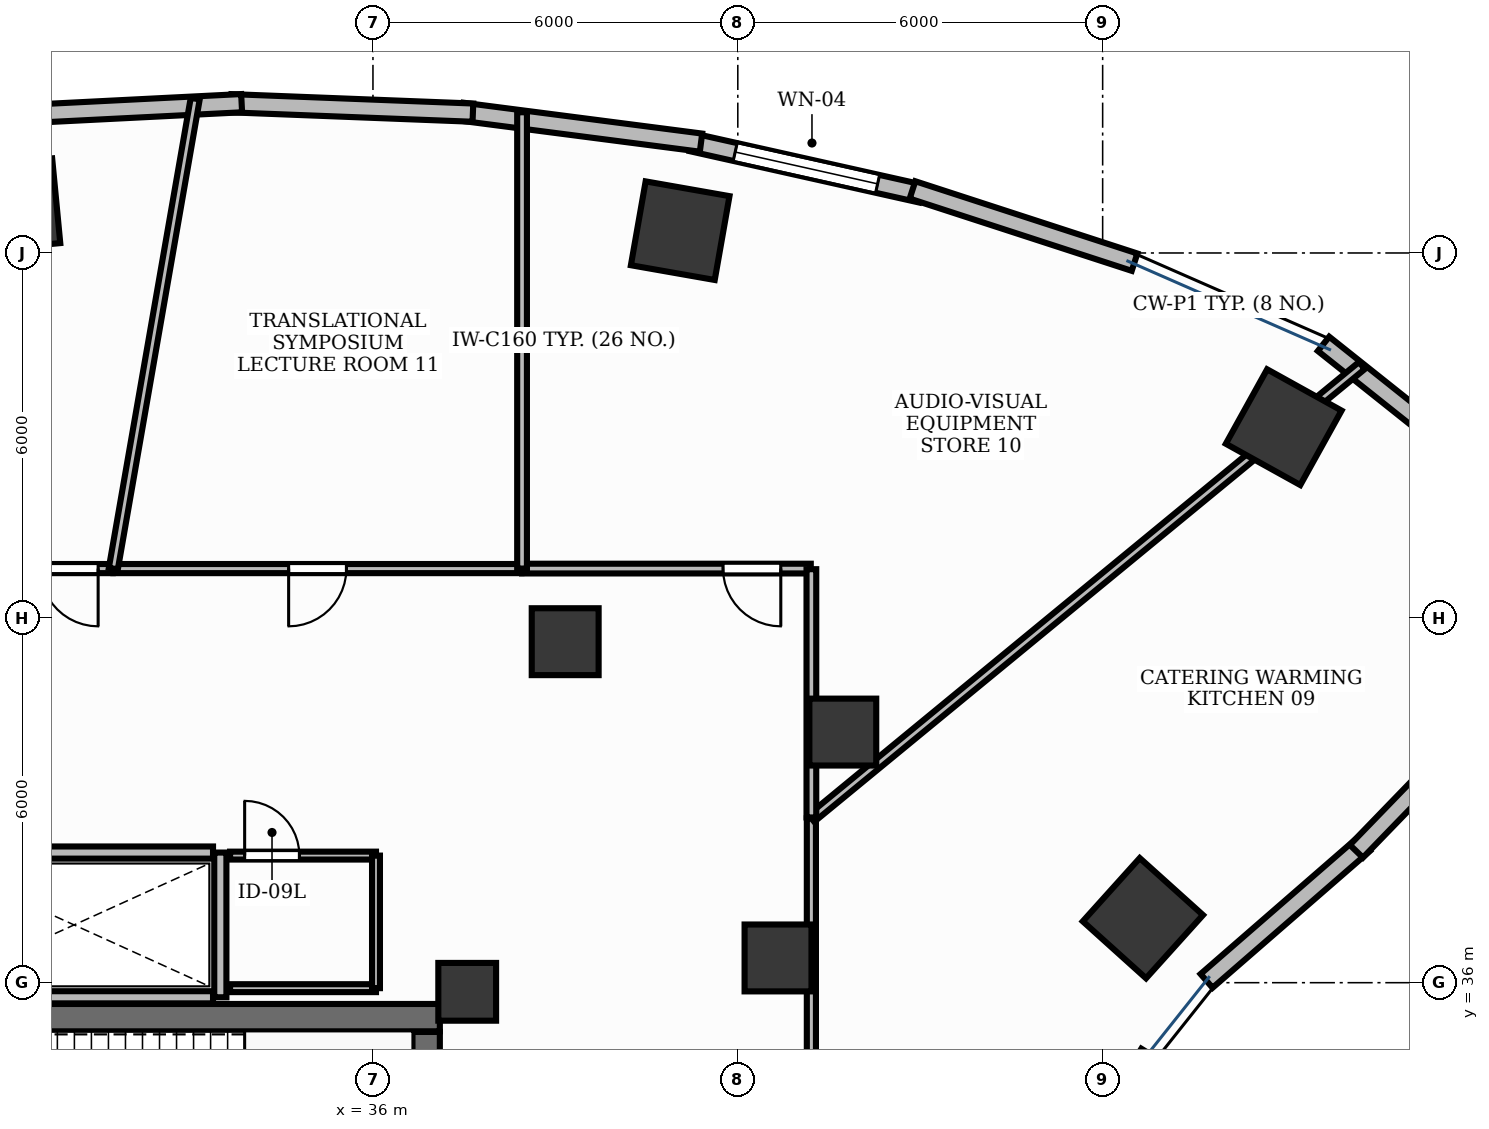
"""IFC4 building model, lengths in metres.
Left out: names, types, materials, properties, quantities, classifications, styles, units other than length and angle.
Written with IfcOpenShell. Run it as: python <this file> out.ifc"""

import sys

from ifc_helpers import new_model, si_unit, direction, frame, frame_2d, origin, origin_2d, place, context, subcontext, project, spatial, rectangle, extrude, element, fill, save


model = new_model("IFC4")
c1 = context("Model", 3, precision=1e-05, world=origin(), true_north=direction((0.0, 1.0)))
c2 = subcontext(c1, "Body", "Model", "MODEL_VIEW")
j1 = project(units=[si_unit("LENGTHUNIT", "METRE"), si_unit("PLANEANGLEUNIT", "RADIAN")], contexts=[c1])
p1 = place(None, origin())
s1 = spatial("IfcSite", under=j1, at=p1, CompositionType="ELEMENT")
p2 = place(p1, origin())
s2 = spatial("IfcBuilding", under=s1, at=p2, CompositionType="ELEMENT")
p3 = place(p2, frame((0.0, 0.0, 5.4)))
s3 = spatial("IfcBuildingStorey", under=s2, at=p3, CompositionType="ELEMENT", Elevation=5.4)
p4 = place(p3, frame((28.852, 35.425, 0.0), z_axis=(0.0, 0.0, 1.0), x_axis=(1.0, 0.0, 0.0)))
e1 = element("IfcWall", 1, at=p4, inside=s3, PredefinedType="SHEAR", context=c2, shape_type="SweptSolid", body=[
    extrude(rectangle(XDim=8.248, YDim=0.45, at=frame_2d((4.124, 0.0))), origin(), (0.0, 0.0, 1.0), 4.5),
])
p5 = place(p3, frame((36.875, 32.11, 0.0), z_axis=(0.0, 0.0, 1.0), x_axis=(0.0, 1.0, 0.0)))
e2 = element("IfcWall", 2, at=p5, inside=s3, PredefinedType="SHEAR", context=c2, shape_type="SweptSolid", body=[
    extrude(rectangle(XDim=3.08, YDim=0.45, at=frame_2d((1.54, 0.0))), origin(), (0.0, 0.0, 1.0), 4.5),
])
p6 = place(p3, frame((37.55, 35.85, -0.0), z_axis=(0.0, 0.0, 1.0), x_axis=(1.0, 0.0, 0.0)))
e3 = element("IfcColumn", 3, at=p6, inside=s3, PredefinedType="PILASTER", context=c2, shape_type="SweptSolid", body=[
    extrude(rectangle(XDim=0.95, YDim=0.95, at=origin_2d()), origin(), (0.0, 0.0, 1.0), 4.501),
])
p7 = place(p3, frame((50.977, 45.135, -0.0), z_axis=(0.0, 0.0, 1.0), x_axis=(-0.874535078577, 0.484962262797, 0.0)))
e4 = element("IfcColumn", 4, at=p7, inside=s3, PredefinedType="COLUMN", context=c2, shape_type="SweptSolid", body=[
    extrude(rectangle(XDim=1.4, YDim=1.4, at=origin_2d()), origin(), (0.0, 0.0, 1.0), 4.501),
])
p8 = place(p3, frame((43.727, 40.121, -0.0), z_axis=(0.0, 0.0, 1.0), x_axis=(1.0, 0.0, 0.0)))
e5 = element("IfcColumn", 5, at=p8, inside=s3, PredefinedType="COLUMN", context=c2, shape_type="SweptSolid", body=[
    extrude(rectangle(XDim=1.1, YDim=1.1, at=origin_2d()), origin(), (0.0, 0.0, 1.0), 4.501),
])
p9 = place(p3, frame((41.052, 48.367, -0.0), z_axis=(0.0, 0.0, 1.0), x_axis=(-0.984868307662, 0.173304404339, 0.0)))
e6 = element("IfcColumn", 6, at=p9, inside=s3, PredefinedType="COLUMN", context=c2, shape_type="SweptSolid", body=[
    extrude(rectangle(XDim=1.4, YDim=1.4, at=origin_2d()), origin(), (0.0, 0.0, 1.0), 4.501),
])
p10 = place(p3, frame((39.161, 41.608, -0.0), z_axis=(0.0, 0.0, 1.0), x_axis=(1.0, 0.0, 0.0)))
e7 = element("IfcColumn", 7, at=p10, inside=s3, PredefinedType="COLUMN", context=c2, shape_type="SweptSolid", body=[
    extrude(rectangle(XDim=1.1, YDim=1.1, at=origin_2d()), origin(), (0.0, 0.0, 1.0), 4.501),
])
for number, where, z_axis, x_axis in (
    (8, (30.094, 48.792, -0.0), (0.0, 0.0, 1.0), (0.995, 0.095, 0.0)),
    (9, (48.662, 37.061, -0.0), (0.0, 0.0, 1.0), (0.669, 0.743, 0.0)),
):
    element("IfcColumn", number, at=place(p3, frame(where, z_axis=z_axis, x_axis=x_axis)), inside=s3, PredefinedType="COLUMN", context=c2, shape_type="SweptSolid", body=[
        extrude(rectangle(XDim=1.4, YDim=1.4, at=origin_2d()), origin(), (0.0, 0.0, 1.0), 4.501),
    ])
p11 = place(p3, frame((42.662, 36.407, -0.0), z_axis=(0.0, 0.0, 1.0), x_axis=(1.0, 0.0, 0.0)))
e10 = element("IfcColumn", 10, at=p11, inside=s3, PredefinedType="COLUMN", context=c2, shape_type="SweptSolid", body=[
    extrude(rectangle(XDim=1.1, YDim=1.1, at=origin_2d()), origin(), (0.0, 0.0, 1.0), 4.501),
])
p12 = place(p3, frame((45.016, 48.976, 0.0), z_axis=(0.0, 0.0, 1.0), x_axis=(-0.9758772609, 0.218319883791, 0.0)))
e11 = element("IfcWall", 11, at=p12, inside=s3, PredefinedType="STANDARD", context=c2, shape_type="SweptSolid", body=[
    extrude(rectangle(XDim=3.869, YDim=0.3, at=frame_2d((1.935, 0.0))), origin(), (0.0, 0.0, 1.0), 4.5),
])
p13 = place(p12, frame((0.735, 0.0, 1.5)))
e12 = element("IfcOpeningElement", 12, at=p13, cuts=e11, PredefinedType="OPENING", context=c2, shape_type="SweptSolid", body=[
    extrude(rectangle(XDim=2.4, YDim=1.2, at=frame_2d((1.2, 0.6))), frame((0.0, 0.165, 0.0), z_axis=(0.0, -1.0, 0.0), x_axis=(1.0, 0.0, 0.0)), (0.0, 0.0, 1.0), 0.33),
])
p14 = place(p3, frame((48.525, 47.849, 0.0), z_axis=(0.0, 0.0, 1.0), x_axis=(-0.950965833732, 0.309295947393, 0.0)))
e13 = element("IfcWall", 13, at=p14, inside=s3, PredefinedType="STANDARD", context=c2, shape_type="SweptSolid", body=[
    extrude(rectangle(XDim=3.84, YDim=0.3, at=frame_2d((1.92, 0.0))), origin(), (0.0, 0.0, 1.0), 4.5),
])
p15 = place(p3, frame((41.395, 49.815, 0.0), z_axis=(0.0, 0.0, 1.0), x_axis=(-0.991734095036, 0.128310111617, 0.0)))
e14 = element("IfcWall", 14, at=p15, inside=s3, PredefinedType="STANDARD", context=c2, shape_type="SweptSolid", body=[
    extrude(rectangle(XDim=3.956, YDim=0.3, at=frame_2d((1.978, 0.0))), origin(), (0.0, 0.0, 1.0), 4.5),
])
p16 = place(p3, frame((37.644, 50.308, 0.0), z_axis=(0.0, 0.0, 1.0), x_axis=(-0.999245411623, 0.038840794937, 0.0)))
e15 = element("IfcWall", 15, at=p16, inside=s3, PredefinedType="STANDARD", context=c2, shape_type="SweptSolid", body=[
    extrude(rectangle(XDim=3.979, YDim=0.3, at=frame_2d((1.989, 0.0))), origin(), (0.0, 0.0, 1.0), 4.5),
])
p17 = place(p3, frame((33.84, 50.463, 0.0), z_axis=(0.0, 0.0, 1.0), x_axis=(-0.998732359232, -0.050335619826, 0.0)))
e16 = element("IfcWall", 16, at=p17, inside=s3, PredefinedType="STANDARD", context=c2, shape_type="SweptSolid", body=[
    extrude(rectangle(XDim=3.977, YDim=0.3, at=frame_2d((1.989, 0.0))), origin(), (0.0, 0.0, 1.0), 4.5),
])
p18 = place(p3, frame((47.825, 33.303, 0.0), z_axis=(0.0, 0.0, 1.0), x_axis=(0.522520662875, 0.852626622191, 0.0)))
e17 = element("IfcWall", 17, at=p18, inside=s3, PredefinedType="STANDARD", context=c2, shape_type="SweptSolid", body=[
    extrude(rectangle(XDim=1.798, YDim=0.3, at=frame_2d((0.899, 0.0))), origin(), (0.0, 0.0, 1.0), 4.5),
])
p19 = place(p3, frame((49.709, 36.029, 0.0), z_axis=(0.0, 0.0, 1.0), x_axis=(0.754746490246, 0.656016566454, 0.0)))
e18 = element("IfcWall", 18, at=p19, inside=s3, PredefinedType="STANDARD", context=c2, shape_type="SweptSolid", body=[
    extrude(rectangle(XDim=3.43, YDim=0.3, at=frame_2d((1.715, 0.0))), origin(), (0.0, 0.0, 1.0), 4.5),
])
p20 = place(p3, frame((52.173, 38.161, 0.0), z_axis=(0.0, 0.0, 1.0), x_axis=(0.695404695719, 0.718618333451, 0.0)))
e19 = element("IfcWall", 19, at=p20, inside=s3, PredefinedType="STANDARD", context=c2, shape_type="SweptSolid", body=[
    extrude(rectangle(XDim=2.188, YDim=0.3, at=frame_2d((1.094, 0.0))), origin(), (0.0, 0.0, 1.0), 4.5),
])
p21 = place(p3, frame((53.344, 45.143, 0.0), z_axis=(0.0, 0.0, 1.0), x_axis=(-0.782282158644, 0.622924252432, 0.0)))
e20 = element("IfcWall", 20, at=p21, inside=s3, PredefinedType="STANDARD", context=c2, shape_type="SweptSolid", body=[
    extrude(rectangle(XDim=2.188, YDim=0.3, at=frame_2d((1.094, 0.0))), origin(), (0.0, 0.0, 1.0), 4.5),
])
p22 = place(p3, frame((33.49, 35.76, 0.0), z_axis=(0.0, 0.0, 1.0), x_axis=(0.0, 1.0, 0.0)))
e21 = element("IfcWall", 21, at=p22, inside=s3, PredefinedType="PARTITIONING", context=c2, shape_type="SweptSolid", body=[
    extrude(rectangle(XDim=2.38, YDim=0.2, at=frame_2d((1.19, 0.0))), origin(), (0.0, 0.0, 1.0), 3.51),
])
for number, where, z_axis, x_axis in (
    (22, (28.8, 35.76, 0.0), (0.0, 0.0, 1.0), (1.0, 0.0, 0.0)),
    (23, (28.8, 38.14, 0.0), (0.0, 0.0, 1.0), (1.0, 0.0, 0.0)),
):
    element("IfcWall", number, at=place(p3, frame(where, z_axis=z_axis, x_axis=x_axis)), inside=s3, PredefinedType="PARTITIONING", context=c2, shape_type="SweptSolid", body=[
        extrude(rectangle(XDim=4.57, YDim=0.2, at=frame_2d((2.285, 0.0))), origin(), (0.0, 0.0, 1.0), 3.51),
    ])
p23 = place(p3, frame((33.65, 38.09, 0.0), z_axis=(0.0, 0.0, 1.0), x_axis=(1.0, 0.0, 0.0)))
e24 = element("IfcWall", 24, at=p23, inside=s3, PredefinedType="PARTITIONING", context=c2, shape_type="SweptSolid", body=[
    extrude(rectangle(XDim=2.4, YDim=0.13, at=frame_2d((1.2, 0.0))), origin(), (0.0, 0.0, 1.0), 3.51),
])
p24 = place(p23, frame((0.24, 0.0, 0.0)))
e25 = element("IfcOpeningElement", 25, at=p24, cuts=e24, PredefinedType="OPENING", context=c2, shape_type="SweptSolid", body=[
    extrude(rectangle(XDim=0.9, YDim=2.15, at=frame_2d((0.45, 1.075))), frame((0.0, 0.08, 0.0), z_axis=(0.0, -1.0, 0.0), x_axis=(1.0, 0.0, 0.0)), (0.0, 0.0, 1.0), 0.16),
])
p25 = place(p3, frame((43.21, 27.902, 0.0), z_axis=(0.0, 0.0, 1.0), x_axis=(0.0, 1.0, 0.0)))
e26 = element("IfcWall", 26, at=p25, inside=s3, PredefinedType="PARTITIONING", context=c2, shape_type="SweptSolid", body=[
    extrude(rectangle(XDim=10.802, YDim=0.15, at=frame_2d((5.401, 0.0))), origin(), (0.0, 0.0, 1.0), 3.51),
])
p26 = place(p25, frame((3.62, 0.0, 0.0)))
e27 = element("IfcOpeningElement", 27, at=p26, cuts=e26, PredefinedType="OPENING", context=c2, shape_type="SweptSolid", body=[
    extrude(rectangle(XDim=0.95, YDim=2.15, at=frame_2d((0.475, 1.075))), frame((0.0, 0.09, 0.0), z_axis=(0.0, -1.0, 0.0), x_axis=(1.0, 0.0, 0.0)), (0.0, 0.0, 1.0), 0.18),
])
p27 = place(p3, frame((43.2, 42.81, 0.0), z_axis=(0.0, 0.0, 1.0), x_axis=(-1.0, 0.0, 0.0)))
e28 = element("IfcWall", 28, at=p27, inside=s3, PredefinedType="PARTITIONING", context=c2, shape_type="SweptSolid", body=[
    extrude(rectangle(XDim=4.748, YDim=0.16, at=frame_2d((2.374, 0.0))), origin(), (0.0, 0.0, 1.0), 3.51),
])
p28 = place(p27, frame((0.493, 0.0, 0.0)))
e29 = element("IfcOpeningElement", 29, at=p28, cuts=e28, PredefinedType="OPENING", context=c2, shape_type="SweptSolid", body=[
    extrude(rectangle(XDim=0.95, YDim=2.15, at=frame_2d((0.475, 1.075))), frame((0.0, 0.095, 0.0), z_axis=(0.0, -1.0, 0.0), x_axis=(1.0, 0.0, 0.0)), (0.0, 0.0, 1.0), 0.19),
])
p29 = place(p3, frame((38.442, 42.81, 0.0), z_axis=(0.0, 0.0, 1.0), x_axis=(-1.0, 0.0, 0.0)))
e30 = element("IfcWall", 30, at=p29, inside=s3, PredefinedType="PARTITIONING", context=c2, shape_type="SweptSolid", body=[
    extrude(rectangle(XDim=6.711, YDim=0.15, at=frame_2d((3.356, 0.0))), origin(), (0.0, 0.0, 1.0), 3.51),
])
p30 = place(p29, frame((2.879, 0.0, 0.0)))
e31 = element("IfcOpeningElement", 31, at=p30, cuts=e30, PredefinedType="OPENING", context=c2, shape_type="SweptSolid", body=[
    extrude(rectangle(XDim=0.95, YDim=2.15, at=frame_2d((0.475, 1.075))), frame((0.0, 0.09, 0.0), z_axis=(0.0, -1.0, 0.0), x_axis=(1.0, 0.0, 0.0)), (0.0, 0.0, 1.0), 0.18),
])
p31 = place(p3, frame((31.721, 42.81, 0.0), z_axis=(0.0, 0.0, 1.0), x_axis=(-1.0, 0.0, 0.0)))
e32 = element("IfcWall", 32, at=p31, inside=s3, PredefinedType="PARTITIONING", context=c2, shape_type="SweptSolid", body=[
    extrude(rectangle(XDim=14.669, YDim=0.15, at=frame_2d((7.334, 0.0))), origin(), (0.0, 0.0, 1.0), 3.51),
])
p32 = place(p31, frame((0.24, 0.0, 0.0)))
e33 = element("IfcOpeningElement", 33, at=p32, cuts=e32, PredefinedType="OPENING", context=c2, shape_type="SweptSolid", body=[
    extrude(rectangle(XDim=0.95, YDim=2.15, at=frame_2d((0.475, 1.075))), frame((0.0, 0.09, 0.0), z_axis=(0.0, -1.0, 0.0), x_axis=(1.0, 0.0, 0.0)), (0.0, 0.0, 1.0), 0.18),
])
p33 = place(p3, frame((36.05, 35.91, 0.0), z_axis=(0.0, 0.0, 1.0), x_axis=(-1.0, 0.0, 0.0)))
e34 = element("IfcWall", 34, at=p33, inside=s3, PredefinedType="PARTITIONING", context=c2, shape_type="SweptSolid", body=[
    extrude(rectangle(XDim=2.4, YDim=0.13, at=frame_2d((1.2, 0.0))), origin(), (0.0, 0.0, 1.0), 3.51),
])
p34 = place(p3, frame((36.05, 38.09, 0.0), z_axis=(0.0, 0.0, 1.0), x_axis=(0.0, -1.0, 0.0)))
e35 = element("IfcWall", 35, at=p34, inside=s3, PredefinedType="PARTITIONING", context=c2, shape_type="SweptSolid", body=[
    extrude(rectangle(XDim=2.18, YDim=0.13, at=frame_2d((1.09, 0.0))), origin(), (0.0, 0.0, 1.0), 3.51),
])
p35 = place(p3, frame((43.21, 38.704, 0.0), z_axis=(0.0, 0.0, 1.0), x_axis=(0.772389381315, 0.635149308141, 0.0)))
e36 = element("IfcWall", 36, at=p35, inside=s3, PredefinedType="PARTITIONING", context=c2, shape_type="SweptSolid", body=[
    extrude(rectangle(XDim=11.721, YDim=0.15, at=frame_2d((5.861, 0.0))), origin(), (0.0, 0.0, 1.0), 3.51),
])
p36 = place(p3, frame((43.21, 38.717, 0.0), z_axis=(0.0, 0.0, 1.0), x_axis=(0.0, 1.0, 0.0)))
e37 = element("IfcWall", 37, at=p36, inside=s3, PredefinedType="PARTITIONING", context=c2, shape_type="SweptSolid", body=[
    extrude(rectangle(XDim=4.083, YDim=0.16, at=frame_2d((2.042, 0.0))), origin(), (0.0, 0.0, 1.0), 3.51),
])
p37 = place(p3, frame((38.452, 42.81, 0.0), z_axis=(0.0, 0.0, 1.0), x_axis=(0.0, 1.0, 0.0)))
e38 = element("IfcWall", 38, at=p37, inside=s3, PredefinedType="PARTITIONING", context=c2, shape_type="SweptSolid", body=[
    extrude(rectangle(XDim=7.504, YDim=0.16, at=frame_2d((3.752, 0.0))), origin(), (0.0, 0.0, 1.0), 3.51),
])
p38 = place(p3, frame((31.73, 42.81, 0.0), z_axis=(0.0, 0.0, 1.0), x_axis=(0.171661622949, 0.985155971005, 0.0)))
e39 = element("IfcWall", 39, at=p38, inside=s3, PredefinedType="PARTITIONING", context=c2, shape_type="SweptSolid", body=[
    extrude(rectangle(XDim=7.845, YDim=0.15, at=frame_2d((3.922, 0.0))), origin(), (0.0, 0.0, 1.0), 3.51),
])
p39 = place(p13, origin())
e40 = element("IfcWindow", 40, at=p39, inside=s3, PartitioningType="DOUBLE_PANEL_HORIZONTAL", PredefinedType="WINDOW", context=c2, shape_type="SweptSolid", body=[
    extrude(rectangle(XDim=2.4, YDim=1.2, at=frame_2d((1.2, 0.6))), frame((0.0, 0.03, 0.0), z_axis=(0.0, -1.0, 0.0), x_axis=(1.0, 0.0, 0.0)), (0.0, 0.0, 1.0), 0.06),
])
fill(e12, e40)
p40 = place(p24, origin())
e41 = element("IfcDoor", 41, at=p40, inside=s3, OperationType="SINGLE_SWING_LEFT", PredefinedType="DOOR", context=c2, shape_type="SweptSolid", body=[
    extrude(rectangle(XDim=0.9, YDim=2.15, at=frame_2d((0.45, 1.075))), frame((0.0, 0.025, 0.0), z_axis=(0.0, -1.0, 0.0), x_axis=(1.0, 0.0, 0.0)), (0.0, 0.0, 1.0), 0.05),
])
fill(e25, e41)
p41 = place(p28, origin())
e42 = element("IfcDoor", 42, at=p41, inside=s3, OperationType="SINGLE_SWING_LEFT", PredefinedType="DOOR", context=c2, shape_type="SweptSolid", body=[
    extrude(rectangle(XDim=0.95, YDim=2.15, at=frame_2d((0.475, 1.075))), frame((0.0, 0.025, 0.0), z_axis=(0.0, -1.0, 0.0), x_axis=(1.0, 0.0, 0.0)), (0.0, 0.0, 1.0), 0.05),
])
fill(e29, e42)
p42 = place(p30, origin())
e43 = element("IfcDoor", 43, at=p42, inside=s3, OperationType="SINGLE_SWING_RIGHT", PredefinedType="DOOR", context=c2, shape_type="SweptSolid", body=[
    extrude(rectangle(XDim=0.95, YDim=2.15, at=frame_2d((0.475, 1.075))), frame((0.0, 0.025, 0.0), z_axis=(0.0, -1.0, 0.0), x_axis=(1.0, 0.0, 0.0)), (0.0, 0.0, 1.0), 0.05),
])
fill(e31, e43)
p43 = place(p32, origin())
e44 = element("IfcDoor", 44, at=p43, inside=s3, OperationType="SINGLE_SWING_LEFT", PredefinedType="DOOR", context=c2, shape_type="SweptSolid", body=[
    extrude(rectangle(XDim=0.95, YDim=2.15, at=frame_2d((0.475, 1.075))), frame((0.0, 0.025, 0.0), z_axis=(0.0, -1.0, 0.0), x_axis=(1.0, 0.0, 0.0)), (0.0, 0.0, 1.0), 0.05),
])
fill(e33, e44)
save(model, sys.argv[1])
